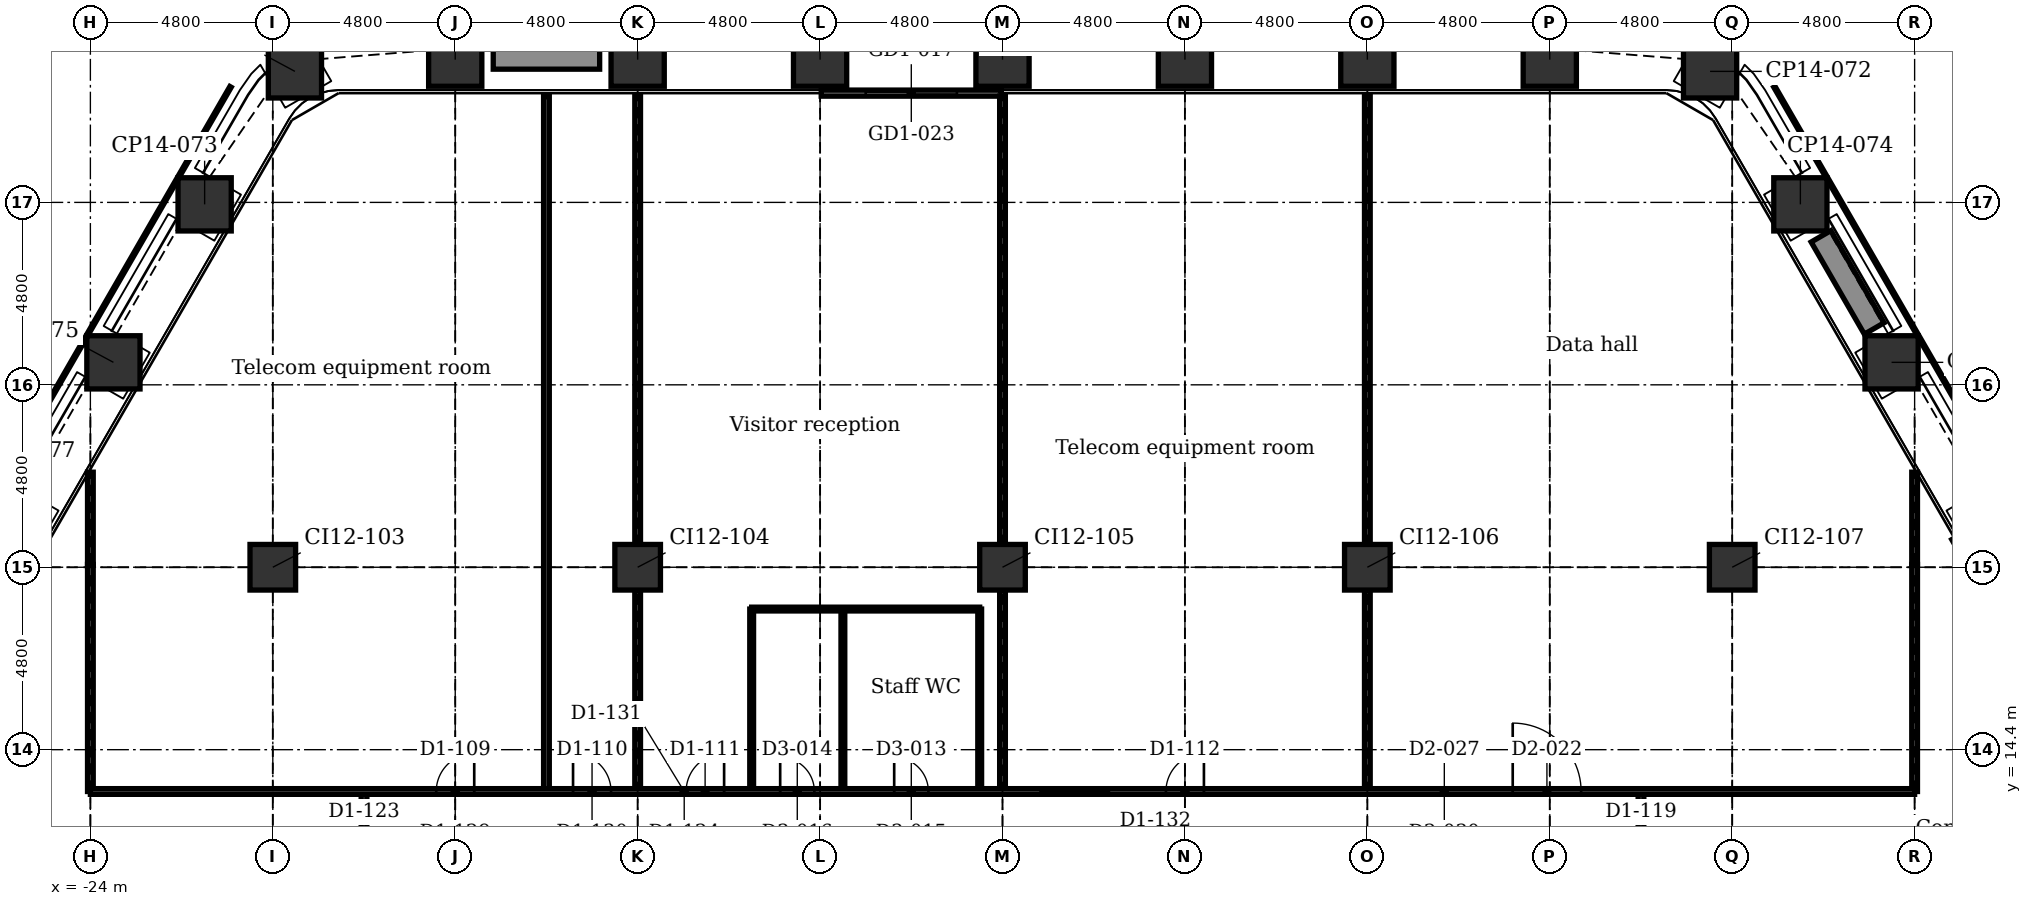
"""IFC4 building model, lengths in metres.
Left out: names, types, materials, properties, quantities, classifications, styles, units other than length and angle.
Written with IfcOpenShell. Run it as: python <this file> out.ifc"""

import sys

from ifc_helpers import new_model, si_unit, direction, frame, frame_2d, origin, origin_2d, place, context, subcontext, project, spatial, rectangle, extrude, element, fill, save


model = new_model("IFC4")
c1 = context("Model", 3, precision=1e-05, world=origin(), true_north=direction((0.0, 1.0)))
c2 = subcontext(c1, "Body", "Model", "MODEL_VIEW")
j1 = project(units=[si_unit("LENGTHUNIT", "METRE"), si_unit("PLANEANGLEUNIT", "RADIAN")], contexts=[c1])
p1 = place(None, origin())
s1 = spatial("IfcSite", under=j1, at=p1, CompositionType="ELEMENT")
p2 = place(p1, origin())
s2 = spatial("IfcBuilding", under=s1, at=p2, CompositionType="ELEMENT")
p3 = place(p2, frame((0.0, 0.0, 44.4)))
s3 = spatial("IfcBuildingStorey", under=s2, at=p3, CompositionType="ELEMENT", Elevation=44.4)
for number, where, z_axis, x_axis in (
    (1, (-18.618, 32.247, -0.25), (0.0, 0.0, 1.0), (0.866, 0.5, 0.0)),
    (2, (-14.4, 32.555, -0.25), (0.0, 0.0, 1.0), (1.0, 0.0, 0.0)),
    (3, (-9.6, 32.555, -0.25), (0.0, 0.0, 1.0), (1.0, 0.0, 0.0)),
    (4, (-4.8, 32.555, -0.25), (0.0, 0.0, 1.0), (1.0, 0.0, 0.0)),
    (5, (0.0, 32.555, -0.25), (0.0, 0.0, 1.0), (1.0, 0.0, 0.0)),
    (6, (4.8, 32.555, -0.25), (0.0, 0.0, 1.0), (1.0, 0.0, 0.0)),
    (7, (9.6, 32.555, -0.25), (0.0, 0.0, 1.0), (1.0, 0.0, 0.0)),
    (8, (14.4, 32.555, -0.25), (0.0, 0.0, 1.0), (1.0, 0.0, 0.0)),
    (9, (18.618, 32.247, -0.25), (0.0, 0.0, 1.0), (0.5, 0.866, 0.0)),
    (10, (20.994, 28.749, -0.25), (0.0, 0.0, 1.0), (0.866, 0.5, 0.0)),
    (11, (23.394, 24.592, -0.25), (0.0, 0.0, 1.0), (0.866, 0.5, 0.0)),
    (12, (25.794, 20.435, -0.25), (0.0, 0.0, 1.0), (0.866, 0.5, 0.0)),
    (13, (-25.794, 20.435, -0.25), (0.0, 0.0, 1.0), (0.5, 0.866, 0.0)),
    (14, (-23.394, 24.592, -0.25), (0.0, 0.0, 1.0), (0.5, 0.866, 0.0)),
    (15, (-20.994, 28.749, -0.25), (0.0, 0.0, 1.0), (0.5, 0.866, 0.0)),
):
    element("IfcColumn", number, at=place(p3, frame(where, z_axis=z_axis, x_axis=x_axis)), inside=s3, PredefinedType="COLUMN", context=c2, shape_type="SweptSolid", body=[
        extrude(rectangle(XDim=1.4, YDim=1.4, at=origin_2d()), origin(), (0.0, 0.0, 1.0), 5.5),
    ])
for number, where, z_axis, x_axis in (
    (16, (-19.2, 19.2, -0.25), (0.0, 0.0, 1.0), (1.0, 0.0, 0.0)),
    (17, (-9.6, 19.2, -0.25), (0.0, 0.0, 1.0), (1.0, 0.0, 0.0)),
    (18, (0.0, 19.2, -0.25), (0.0, 0.0, 1.0), (1.0, 0.0, 0.0)),
    (19, (9.6, 19.2, -0.25), (0.0, 0.0, 1.0), (1.0, 0.0, 0.0)),
    (20, (19.2, 19.2, -0.25), (0.0, 0.0, 1.0), (1.0, 0.0, 0.0)),
):
    element("IfcColumn", number, at=place(p3, frame(where, z_axis=z_axis, x_axis=x_axis)), inside=s3, PredefinedType="COLUMN", context=c2, shape_type="SweptSolid", body=[
        extrude(rectangle(XDim=1.2, YDim=1.2, at=origin_2d()), origin(), (0.0, 0.0, 1.0), 5.5),
    ])
p4 = place(p3, frame((-4.77, 31.675, 0.0), z_axis=(0.0, 0.0, 1.0), x_axis=(1.0, 0.0, 0.0)))
e21 = element("IfcWall", 21, at=p4, inside=s3, PredefinedType="PARTITIONING", context=c2, shape_type="SweptSolid", body=[
    extrude(rectangle(XDim=4.74, YDim=0.16, at=frame_2d((2.37, 0.0))), origin(), (0.0, 0.0, 1.0), 5.25),
])
p5 = place(p4, frame((1.17, 0.0, 0.0)))
e22 = element("IfcOpeningElement", 22, at=p5, cuts=e21, PredefinedType="OPENING", context=c2, shape_type="SweptSolid", body=[
    extrude(rectangle(XDim=2.4, YDim=2.4, at=frame_2d((1.2, 1.2))), frame((0.0, 0.09, 0.0), z_axis=(0.0, -1.0, 0.0), x_axis=(1.0, 0.0, 0.0)), (0.0, 0.0, 1.0), 0.18),
])
p6 = place(p3, frame((25.047, 19.969, 0.0), z_axis=(0.0, 0.0, 1.0), x_axis=(0.5000167099, -0.866015756104, 0.0)))
e23 = element("IfcWall", 23, at=p6, inside=s3, PredefinedType="PARTITIONING", context=c2, shape_type="SweptSolid", body=[
    extrude(rectangle(XDim=4.74, YDim=0.16, at=frame_2d((2.37, 0.0))), origin(), (0.0, 0.0, 1.0), 5.25),
])
p7 = place(p6, frame((1.17, 0.0, 0.0)))
e24 = element("IfcOpeningElement", 24, at=p7, cuts=e23, PredefinedType="OPENING", context=c2, shape_type="SweptSolid", body=[
    extrude(rectangle(XDim=2.4, YDim=2.4, at=frame_2d((1.2, 1.2))), frame((0.0, 0.09, 0.0), z_axis=(0.0, -1.0, 0.0), x_axis=(1.0, 0.0, 0.0)), (0.0, 0.0, 1.0), 0.18),
])
for number, where, z_axis, x_axis in (
    (25, (-13.4, 32.605, 0.0), (0.0, 0.0, 1.0), (1.0, 0.0, 0.0)),
    (26, (21.537, 27.907, 0.0), (0.0, 0.0, 1.0), (0.5, -0.866, 0.0)),
):
    element("IfcWall", number, at=place(p3, frame(where, z_axis=z_axis, x_axis=x_axis)), inside=s3, PredefinedType="USERDEFINED", context=c2, shape_type="SweptSolid", body=[
        extrude(rectangle(XDim=2.8, YDim=0.6, at=frame_2d((1.4, 0.0))), origin(), (0.0, 0.0, 1.0), 0.7),
    ])
p8 = place(p3, frame((24.0, 13.3, 0.0), z_axis=(0.0, 0.0, 1.0), x_axis=(0.0, 1.0, 0.0)))
e27 = element("IfcWall", 27, at=p8, inside=s3, PredefinedType="PARTITIONING", context=c2, shape_type="SweptSolid", body=[
    extrude(rectangle(XDim=5.974, YDim=0.15, at=frame_2d((2.987, 0.0))), origin(), (0.0, 0.0, 1.0), 4.717),
])
p9 = place(p3, frame((24.0, 19.274, 0.0), z_axis=(0.0, 0.0, 1.0), x_axis=(0.0, 1.0, 0.0)))
e28 = element("IfcWall", 28, at=p9, inside=s3, PredefinedType="PARTITIONING", context=c2, shape_type="SweptSolid", body=[
    extrude(rectangle(XDim=2.427, YDim=0.15, at=frame_2d((1.214, 0.0))), origin(), (0.0, 0.0, 1.0), 4.94),
])
p10 = place(p3, frame((16.8, 3.95, 0.0), z_axis=(0.0, 0.0, 1.0), x_axis=(0.0, 1.0, 0.0)))
e29 = element("IfcWall", 29, at=p10, inside=s3, PredefinedType="PARTITIONING", context=c2, shape_type="SweptSolid", body=[
    extrude(rectangle(XDim=9.35, YDim=0.15, at=frame_2d((4.675, 0.0))), origin(), (0.0, 0.0, 1.0), 5.25),
])
p11 = place(p10, frame((1.275, 0.0, 0.0)))
e30 = element("IfcOpeningElement", 30, at=p11, cuts=e29, PredefinedType="OPENING", context=c2, shape_type="SweptSolid", body=[
    extrude(rectangle(XDim=1.0, YDim=2.1, at=frame_2d((0.5, 1.05))), frame((0.0, 0.085, 0.0), z_axis=(0.0, -1.0, 0.0), x_axis=(1.0, 0.0, 0.0)), (0.0, 0.0, 1.0), 0.17),
])
p12 = place(p10, frame((3.745, 0.0, 0.0)))
e31 = element("IfcOpeningElement", 31, at=p12, cuts=e29, PredefinedType="OPENING", context=c2, shape_type="SweptSolid", body=[
    extrude(rectangle(XDim=1.0, YDim=2.1, at=frame_2d((0.5, 1.05))), frame((0.0, 0.085, 0.0), z_axis=(0.0, -1.0, 0.0), x_axis=(1.0, 0.0, 0.0)), (0.0, 0.0, 1.0), 0.17),
])
p13 = place(p10, frame((7.2, 0.0, 0.0)))
e32 = element("IfcOpeningElement", 32, at=p13, cuts=e29, PredefinedType="OPENING", context=c2, shape_type="SweptSolid", body=[
    extrude(rectangle(XDim=1.0, YDim=2.1, at=frame_2d((0.5, 1.05))), frame((0.0, 0.085, 0.0), z_axis=(0.0, -1.0, 0.0), x_axis=(1.0, 0.0, 0.0)), (0.0, 0.0, 1.0), 0.17),
])
p14 = place(p3, frame((9.6, 13.3, 0.0), z_axis=(0.0, 0.0, 1.0), x_axis=(0.0, 1.0, 0.0)))
e33 = element("IfcWall", 33, at=p14, inside=s3, PredefinedType="PARTITIONING", context=c2, shape_type="SweptSolid", body=[
    extrude(rectangle(XDim=5.3, YDim=0.15, at=frame_2d((2.65, 0.0))), origin(), (0.0, 0.0, 1.0), 4.793),
])
p15 = place(p3, frame((9.6, 19.8, 0.0), z_axis=(0.0, 0.0, 1.0), x_axis=(0.0, 1.0, 0.0)))
e34 = element("IfcWall", 34, at=p15, inside=s3, PredefinedType="PARTITIONING", context=c2, shape_type="SweptSolid", body=[
    extrude(rectangle(XDim=11.785, YDim=0.15, at=frame_2d((5.893, 0.0))), origin(), (0.0, 0.0, 1.0), 4.642),
])
p16 = place(p3, frame((0.0, 13.3, 0.0), z_axis=(0.0, 0.0, 1.0), x_axis=(0.0, 1.0, 0.0)))
e35 = element("IfcWall", 35, at=p16, inside=s3, PredefinedType="PARTITIONING", context=c2, shape_type="SweptSolid", body=[
    extrude(rectangle(XDim=5.3, YDim=0.15, at=frame_2d((2.65, 0.0))), origin(), (0.0, 0.0, 1.0), 4.793),
])
p17 = place(p3, frame((0.0, 19.8, 0.0), z_axis=(0.0, 0.0, 1.0), x_axis=(0.0, 1.0, 0.0)))
e36 = element("IfcWall", 36, at=p17, inside=s3, PredefinedType="PARTITIONING", context=c2, shape_type="SweptSolid", body=[
    extrude(rectangle(XDim=11.795, YDim=0.15, at=frame_2d((5.898, 0.0))), origin(), (0.0, 0.0, 1.0), 4.642),
])
for number, where, z_axis, x_axis in (
    (37, (-0.6, 13.3, 0.0), (0.0, 0.0, 1.0), (0.0, 1.0, 0.0)),
    (38, (-4.2, 13.3, 0.0), (0.0, 0.0, 1.0), (0.0, 1.0, 0.0)),
    (39, (-6.6, 13.3, 0.0), (0.0, 0.0, 1.0), (0.0, 1.0, 0.0)),
):
    element("IfcWall", number, at=place(p3, frame(where, z_axis=z_axis, x_axis=x_axis)), inside=s3, PredefinedType="PARTITIONING", context=c2, shape_type="SweptSolid", body=[
        extrude(rectangle(XDim=4.8, YDim=0.1, at=frame_2d((2.4, 0.0))), origin(), (0.0, 0.0, 1.0), 5.25),
    ])
p18 = place(p3, frame((-9.6, 13.3, 0.0), z_axis=(0.0, 0.0, 1.0), x_axis=(0.0, 1.0, 0.0)))
e40 = element("IfcWall", 40, at=p18, inside=s3, PredefinedType="PARTITIONING", context=c2, shape_type="SweptSolid", body=[
    extrude(rectangle(XDim=5.3, YDim=0.15, at=frame_2d((2.65, 0.0))), origin(), (0.0, 0.0, 1.0), 4.793),
])
p19 = place(p3, frame((-9.6, 19.8, 0.0), z_axis=(0.0, 0.0, 1.0), x_axis=(0.0, 1.0, 0.0)))
e41 = element("IfcWall", 41, at=p19, inside=s3, PredefinedType="PARTITIONING", context=c2, shape_type="SweptSolid", body=[
    extrude(rectangle(XDim=11.785, YDim=0.15, at=frame_2d((5.893, 0.0))), origin(), (0.0, 0.0, 1.0), 4.642),
])
p20 = place(p3, frame((-12.0, 13.3, 0.0), z_axis=(0.0, 0.0, 1.0), x_axis=(0.0, 1.0, 0.0)))
e42 = element("IfcWall", 42, at=p20, inside=s3, PredefinedType="PARTITIONING", context=c2, shape_type="SweptSolid", body=[
    extrude(rectangle(XDim=18.285, YDim=0.15, at=frame_2d((9.143, 0.0))), origin(), (0.0, 0.0, 1.0), 5.25),
])
p21 = place(p3, frame((-16.8, 3.95, 0.0), z_axis=(0.0, 0.0, 1.0), x_axis=(0.0, 1.0, 0.0)))
e43 = element("IfcWall", 43, at=p21, inside=s3, PredefinedType="PARTITIONING", context=c2, shape_type="SweptSolid", body=[
    extrude(rectangle(XDim=9.35, YDim=0.15, at=frame_2d((4.675, 0.0))), origin(), (0.0, 0.0, 1.0), 5.25),
])
p22 = place(p21, frame((3.615, 0.0, 0.0)))
e44 = element("IfcOpeningElement", 44, at=p22, cuts=e43, PredefinedType="OPENING", context=c2, shape_type="SweptSolid", body=[
    extrude(rectangle(XDim=1.0, YDim=2.1, at=frame_2d((0.5, 1.05))), frame((0.0, 0.085, 0.0), z_axis=(0.0, -1.0, 0.0), x_axis=(1.0, 0.0, 0.0)), (0.0, 0.0, 1.0), 0.17),
])
p23 = place(p21, frame((7.2, 0.0, 0.0)))
e45 = element("IfcOpeningElement", 45, at=p23, cuts=e43, PredefinedType="OPENING", context=c2, shape_type="SweptSolid", body=[
    extrude(rectangle(XDim=1.0, YDim=2.1, at=frame_2d((0.5, 1.05))), frame((0.0, 0.085, 0.0), z_axis=(0.0, -1.0, 0.0), x_axis=(1.0, 0.0, 0.0)), (0.0, 0.0, 1.0), 0.17),
])
p24 = place(p3, frame((-24.0, 13.3, 0.0), z_axis=(0.0, 0.0, 1.0), x_axis=(0.0, 1.0, 0.0)))
e46 = element("IfcWall", 46, at=p24, inside=s3, PredefinedType="PARTITIONING", context=c2, shape_type="SweptSolid", body=[
    extrude(rectangle(XDim=5.974, YDim=0.15, at=frame_2d((2.987, 0.0))), origin(), (0.0, 0.0, 1.0), 4.717),
])
p25 = place(p3, frame((-24.0, 19.274, 0.0), z_axis=(0.0, 0.0, 1.0), x_axis=(0.0, 1.0, 0.0)))
e47 = element("IfcWall", 47, at=p25, inside=s3, PredefinedType="PARTITIONING", context=c2, shape_type="SweptSolid", body=[
    extrude(rectangle(XDim=2.427, YDim=0.15, at=frame_2d((1.214, 0.0))), origin(), (0.0, 0.0, 1.0), 4.94),
])
p26 = place(p3, frame((-24.0, 13.3, 0.0), z_axis=(0.0, 0.0, 1.0), x_axis=(1.0, 0.0, 0.0)))
e48 = element("IfcWall", 48, at=p26, inside=s3, PredefinedType="PARTITIONING", context=c2, shape_type="SweptSolid", body=[
    extrude(rectangle(XDim=48.0, YDim=0.15, at=frame_2d((24.0, 0.0))), origin(), (0.0, 0.0, 1.0), 5.25),
])
p27 = place(p26, frame((9.1, 0.0, 0.0)))
e49 = element("IfcOpeningElement", 49, at=p27, cuts=e48, PredefinedType="OPENING", context=c2, shape_type="SweptSolid", body=[
    extrude(rectangle(XDim=1.0, YDim=2.1, at=frame_2d((0.5, 1.05))), frame((0.0, 0.085, 0.0), z_axis=(0.0, -1.0, 0.0), x_axis=(1.0, 0.0, 0.0)), (0.0, 0.0, 1.0), 0.17),
])
p28 = place(p26, frame((12.7, 0.0, 0.0)))
e50 = element("IfcOpeningElement", 50, at=p28, cuts=e48, PredefinedType="OPENING", context=c2, shape_type="SweptSolid", body=[
    extrude(rectangle(XDim=1.0, YDim=2.1, at=frame_2d((0.5, 1.05))), frame((0.0, 0.085, 0.0), z_axis=(0.0, -1.0, 0.0), x_axis=(1.0, 0.0, 0.0)), (0.0, 0.0, 1.0), 0.17),
])
p29 = place(p26, frame((15.675, 0.0, 0.0)))
e51 = element("IfcOpeningElement", 51, at=p29, cuts=e48, PredefinedType="OPENING", context=c2, shape_type="SweptSolid", body=[
    extrude(rectangle(XDim=1.0, YDim=2.1, at=frame_2d((0.5, 1.05))), frame((0.0, 0.085, 0.0), z_axis=(0.0, -1.0, 0.0), x_axis=(1.0, 0.0, 0.0)), (0.0, 0.0, 1.0), 0.17),
])
p30 = place(p26, frame((28.3, 0.0, 0.0)))
e52 = element("IfcOpeningElement", 52, at=p30, cuts=e48, PredefinedType="OPENING", context=c2, shape_type="SweptSolid", body=[
    extrude(rectangle(XDim=1.0, YDim=2.1, at=frame_2d((0.5, 1.05))), frame((0.0, 0.085, 0.0), z_axis=(0.0, -1.0, 0.0), x_axis=(1.0, 0.0, 0.0)), (0.0, 0.0, 1.0), 0.17),
])
p31 = place(p26, frame((37.425, 0.0, 0.0)))
e53 = element("IfcOpeningElement", 53, at=p31, cuts=e48, PredefinedType="OPENING", context=c2, shape_type="SweptSolid", body=[
    extrude(rectangle(XDim=1.8, YDim=2.1, at=frame_2d((0.9, 1.05))), frame((0.0, 0.085, 0.0), z_axis=(0.0, -1.0, 0.0), x_axis=(1.0, 0.0, 0.0)), (0.0, 0.0, 1.0), 0.17),
])
p32 = place(p26, frame((21.15, 0.0, 0.0)))
e54 = element("IfcOpeningElement", 54, at=p32, cuts=e48, PredefinedType="OPENING", context=c2, shape_type="SweptSolid", body=[
    extrude(rectangle(XDim=0.9, YDim=2.1, at=frame_2d((0.45, 1.05))), frame((0.0, 0.085, 0.0), z_axis=(0.0, -1.0, 0.0), x_axis=(1.0, 0.0, 0.0)), (0.0, 0.0, 1.0), 0.17),
])
p33 = place(p26, frame((18.15, 0.0, 0.0)))
e55 = element("IfcOpeningElement", 55, at=p33, cuts=e48, PredefinedType="OPENING", context=c2, shape_type="SweptSolid", body=[
    extrude(rectangle(XDim=0.9, YDim=2.1, at=frame_2d((0.45, 1.05))), frame((0.0, 0.085, 0.0), z_axis=(0.0, -1.0, 0.0), x_axis=(1.0, 0.0, 0.0)), (0.0, 0.0, 1.0), 0.17),
])
p34 = place(p26, frame((25.0, 0.0, 0.9)))
e56 = element("IfcOpeningElement", 56, at=p34, cuts=e48, PredefinedType="OPENING", context=c2, shape_type="SweptSolid", body=[
    extrude(rectangle(XDim=1.8, YDim=1.5, at=frame_2d((0.9, 0.75))), frame((0.0, 0.085, 0.0), z_axis=(0.0, -1.0, 0.0), x_axis=(1.0, 0.0, 0.0)), (0.0, 0.0, 1.0), 0.17),
])
p35 = place(p3, frame((-6.6, 18.1, 0.0), z_axis=(0.0, 0.0, 1.0), x_axis=(1.0, 0.0, 0.0)))
e57 = element("IfcWall", 57, at=p35, inside=s3, PredefinedType="PARTITIONING", context=c2, shape_type="SweptSolid", body=[
    extrude(rectangle(XDim=6.0, YDim=0.1, at=frame_2d((3.0, 0.0))), origin(), (0.0, 0.0, 1.0), 5.25),
])
p36 = place(p5, origin())
e58 = element("IfcDoor", 58, at=p36, inside=s3, OperationType="DOUBLE_DOOR_SLIDING", PredefinedType="DOOR", context=c2, shape_type="SweptSolid", body=[
    extrude(rectangle(XDim=2.4, YDim=2.4, at=frame_2d((1.2, 1.2))), frame((0.0, 0.025, 0.0), z_axis=(0.0, -1.0, 0.0), x_axis=(1.0, 0.0, 0.0)), (0.0, 0.0, 1.0), 0.05),
])
fill(e22, e58)
p37 = place(p27, origin())
e59 = element("IfcDoor", 59, at=p37, inside=s3, OperationType="SINGLE_SWING_RIGHT", PredefinedType="DOOR", context=c2, shape_type="SweptSolid", body=[
    extrude(rectangle(XDim=1.0, YDim=2.1, at=frame_2d((0.5, 1.05))), frame((0.0, 0.025, 0.0), z_axis=(0.0, -1.0, 0.0), x_axis=(1.0, 0.0, 0.0)), (0.0, 0.0, 1.0), 0.05),
])
fill(e49, e59)
p38 = place(p28, origin())
e60 = element("IfcDoor", 60, at=p38, inside=s3, OperationType="SINGLE_SWING_LEFT", PredefinedType="DOOR", context=c2, shape_type="SweptSolid", body=[
    extrude(rectangle(XDim=1.0, YDim=2.1, at=frame_2d((0.5, 1.05))), frame((0.0, 0.025, 0.0), z_axis=(0.0, -1.0, 0.0), x_axis=(1.0, 0.0, 0.0)), (0.0, 0.0, 1.0), 0.05),
])
fill(e50, e60)
p39 = place(p29, origin())
e61 = element("IfcDoor", 61, at=p39, inside=s3, OperationType="SINGLE_SWING_RIGHT", PredefinedType="DOOR", context=c2, shape_type="SweptSolid", body=[
    extrude(rectangle(XDim=1.0, YDim=2.1, at=frame_2d((0.5, 1.05))), frame((0.0, 0.025, 0.0), z_axis=(0.0, -1.0, 0.0), x_axis=(1.0, 0.0, 0.0)), (0.0, 0.0, 1.0), 0.05),
])
fill(e51, e61)
p40 = place(p30, origin())
e62 = element("IfcDoor", 62, at=p40, inside=s3, OperationType="SINGLE_SWING_RIGHT", PredefinedType="DOOR", context=c2, shape_type="SweptSolid", body=[
    extrude(rectangle(XDim=1.0, YDim=2.1, at=frame_2d((0.5, 1.05))), frame((0.0, 0.025, 0.0), z_axis=(0.0, -1.0, 0.0), x_axis=(1.0, 0.0, 0.0)), (0.0, 0.0, 1.0), 0.05),
])
fill(e52, e62)
p41 = place(p31, origin())
e63 = element("IfcDoor", 63, at=p41, inside=s3, OperationType="SINGLE_SWING_LEFT", PredefinedType="DOOR", context=c2, shape_type="SweptSolid", body=[
    extrude(rectangle(XDim=1.8, YDim=2.1, at=frame_2d((0.9, 1.05))), frame((0.0, 0.025, 0.0), z_axis=(0.0, -1.0, 0.0), x_axis=(1.0, 0.0, 0.0)), (0.0, 0.0, 1.0), 0.05),
])
fill(e53, e63)
p42 = place(p32, origin())
e64 = element("IfcDoor", 64, at=p42, inside=s3, OperationType="SINGLE_SWING_LEFT", PredefinedType="DOOR", context=c2, shape_type="SweptSolid", body=[
    extrude(rectangle(XDim=0.9, YDim=2.1, at=frame_2d((0.45, 1.05))), frame((0.0, 0.025, 0.0), z_axis=(0.0, -1.0, 0.0), x_axis=(1.0, 0.0, 0.0)), (0.0, 0.0, 1.0), 0.05),
])
fill(e54, e64)
p43 = place(p33, origin())
e65 = element("IfcDoor", 65, at=p43, inside=s3, OperationType="SINGLE_SWING_LEFT", PredefinedType="DOOR", context=c2, shape_type="SweptSolid", body=[
    extrude(rectangle(XDim=0.9, YDim=2.1, at=frame_2d((0.45, 1.05))), frame((0.0, 0.025, 0.0), z_axis=(0.0, -1.0, 0.0), x_axis=(1.0, 0.0, 0.0)), (0.0, 0.0, 1.0), 0.05),
])
fill(e55, e65)
p44 = place(p34, origin())
e66 = element("IfcWindow", 66, at=p44, inside=s3, PartitioningType="SINGLE_PANEL", PredefinedType="WINDOW", context=c2, shape_type="SweptSolid", body=[
    extrude(rectangle(XDim=1.8, YDim=1.5, at=frame_2d((0.9, 0.75))), frame((0.0, 0.03, 0.0), z_axis=(0.0, -1.0, 0.0), x_axis=(1.0, 0.0, 0.0)), (0.0, 0.0, 1.0), 0.06),
])
fill(e56, e66)
save(model, sys.argv[1])
